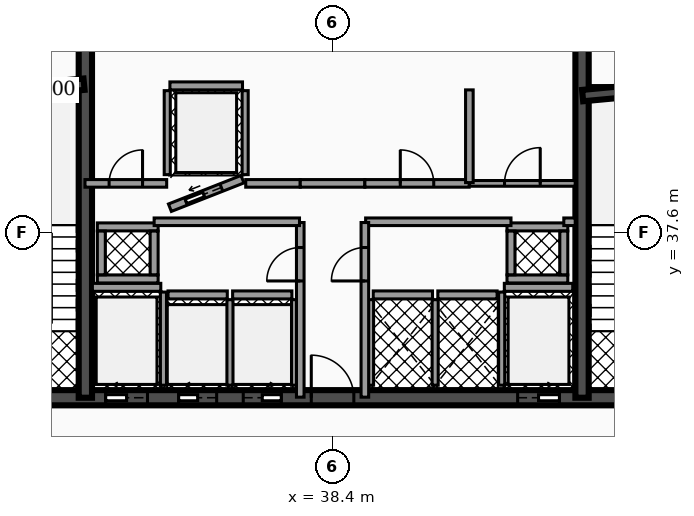
"""IFC4 building model, lengths in metres.
Left out: names, types, materials, properties, quantities, classifications, styles, units other than length and angle.
Written with IfcOpenShell. Run it as: python <this file> out.ifc"""

import sys

from ifc_helpers import new_model, si_unit, direction, frame, frame_2d, origin, place, context, subcontext, project, spatial, rectangle, extrude, element, fill, save


model = new_model("IFC4")
c1 = context("Model", 3, precision=1e-05, world=origin(), true_north=direction((0.0, 1.0)))
c2 = subcontext(c1, "Body", "Model", "MODEL_VIEW")
j1 = project(units=[si_unit("LENGTHUNIT", "METRE"), si_unit("PLANEANGLEUNIT", "RADIAN")], contexts=[c1])
p1 = place(None, origin())
s1 = spatial("IfcSite", under=j1, at=p1, CompositionType="ELEMENT")
p2 = place(p1, origin())
s2 = spatial("IfcBuilding", under=s1, at=p2, CompositionType="ELEMENT")
p3 = place(p2, frame((0.0, 0.0, 190.74)))
s3 = spatial("IfcBuildingStorey", under=s2, at=p3, CompositionType="ELEMENT", Elevation=190.74)
p4 = place(p3, frame((28.4, 33.25, 0.0), z_axis=(0.0, 0.0, 1.0), x_axis=(1.0, 0.0, 0.0)))
e1 = element("IfcWall", 1, at=p4, inside=s3, PredefinedType="SHEAR", context=c2, shape_type="SweptSolid", body=[
    extrude(rectangle(XDim=20.06, YDim=0.4, at=frame_2d((10.03, 0.0))), origin(), (0.0, 0.0, 1.0), 3.39),
])
p5 = place(p4, frame((4.03, 0.0, 0.0)))
e2 = element("IfcOpeningElement", 2, at=p5, cuts=e1, PredefinedType="OPENING", context=c2, shape_type="SweptSolid", body=[
    extrude(rectangle(XDim=1.1, YDim=2.15, at=frame_2d((0.55, 1.075))), frame((0.0, 0.21, 0.0), z_axis=(0.0, -1.0, 0.0), x_axis=(1.0, 0.0, 0.0)), (0.0, 0.0, 1.0), 0.42),
])
p6 = place(p4, frame((14.87, 0.0, 0.0)))
e3 = element("IfcOpeningElement", 3, at=p6, cuts=e1, PredefinedType="OPENING", context=c2, shape_type="SweptSolid", body=[
    extrude(rectangle(XDim=1.1, YDim=2.15, at=frame_2d((0.55, 1.075))), frame((0.0, 0.21, 0.0), z_axis=(0.0, -1.0, 0.0), x_axis=(1.0, 0.0, 0.0)), (0.0, 0.0, 1.0), 0.42),
])
p7 = place(p4, frame((5.95, 0.0, 0.0)))
e4 = element("IfcOpeningElement", 4, at=p7, cuts=e1, PredefinedType="OPENING", context=c2, shape_type="SweptSolid", body=[
    extrude(rectangle(XDim=1.0, YDim=2.1, at=frame_2d((0.5, 1.05))), frame((0.0, 0.21, 0.0), z_axis=(0.0, -1.0, 0.0), x_axis=(1.0, 0.0, 0.0)), (0.0, 0.0, 1.0), 0.42),
])
p8 = place(p4, frame((7.65, 0.0, 0.0)))
e5 = element("IfcOpeningElement", 5, at=p8, cuts=e1, PredefinedType="OPENING", context=c2, shape_type="SweptSolid", body=[
    extrude(rectangle(XDim=1.0, YDim=2.1, at=frame_2d((0.5, 1.05))), frame((0.0, 0.21, 0.0), z_axis=(0.0, -1.0, 0.0), x_axis=(1.0, 0.0, 0.0)), (0.0, 0.0, 1.0), 0.42),
])
p9 = place(p4, frame((1.31, 0.0, 0.0)))
e6 = element("IfcOpeningElement", 6, at=p9, cuts=e1, PredefinedType="OPENING", context=c2, shape_type="SweptSolid", body=[
    extrude(rectangle(XDim=1.1, YDim=2.2, at=frame_2d((0.55, 1.1))), frame((0.0, 0.21, 0.0), z_axis=(0.0, -1.0, 0.0), x_axis=(1.0, 0.0, 0.0)), (0.0, 0.0, 1.0), 0.42),
])
p10 = place(p4, frame((9.44, 0.0, 0.0)))
e7 = element("IfcOpeningElement", 7, at=p10, cuts=e1, PredefinedType="OPENING", context=c2, shape_type="SweptSolid", body=[
    extrude(rectangle(XDim=1.12, YDim=2.05, at=frame_2d((0.56, 1.025))), frame((0.0, 0.21, 0.0), z_axis=(0.0, -1.0, 0.0), x_axis=(1.0, 0.0, 0.0)), (0.0, 0.0, 1.0), 0.42),
])
p11 = place(p4, frame((17.65, 0.0, 0.0)))
e8 = element("IfcOpeningElement", 8, at=p11, cuts=e1, PredefinedType="OPENING", context=c2, shape_type="SweptSolid", body=[
    extrude(rectangle(XDim=1.1, YDim=2.2, at=frame_2d((0.55, 1.1))), frame((0.0, 0.21, 0.0), z_axis=(0.0, -1.0, 0.0), x_axis=(1.0, 0.0, 0.0)), (0.0, 0.0, 1.0), 0.42),
])
for number, where, z_axis, x_axis in (
    (9, (31.895, 33.25, 0.0), (0.0, 0.0, 1.0), (0.0, 1.0, 0.0)),
    (10, (44.965, 33.25, 0.0), (0.0, 0.0, 1.0), (0.0, 1.0, 0.0)),
):
    element("IfcWall", number, at=place(p3, frame(where, z_axis=z_axis, x_axis=x_axis)), inside=s3, PredefinedType="SHEAR", context=c2, shape_type="SweptSolid", body=[
        extrude(rectangle(XDim=10.2, YDim=0.35, at=frame_2d((5.1, 0.0))), origin(), (0.0, 0.0, 1.0), 3.39),
    ])
p12 = place(p3, frame((28.64, 41.2, 0.0), z_axis=(0.0, 0.0, 1.0), x_axis=(0.995687118776, 0.092774789157, 0.0)))
e11 = element("IfcWall", 11, at=p12, inside=s3, PredefinedType="SHEAR", context=c2, shape_type="SweptSolid", body=[
    extrude(rectangle(XDim=3.234, YDim=0.3, at=frame_2d((1.617, 0.0))), origin(), (0.0, 0.0, 1.0), 3.39),
])
p13 = place(p3, frame((44.98, 41.2, 0.0), z_axis=(0.0, 0.0, 1.0), x_axis=(0.995686468965, 0.09278176286, 0.0)))
e12 = element("IfcWall", 12, at=p13, inside=s3, PredefinedType="SHEAR", context=c2, shape_type="SweptSolid", body=[
    extrude(rectangle(XDim=3.234, YDim=0.3, at=frame_2d((1.617, 0.0))), origin(), (0.0, 0.0, 1.0), 3.39),
])
p14 = place(p3, frame((32.08, 36.155, 0.0), z_axis=(0.0, 0.0, 1.0), x_axis=(1.0, 0.0, 0.0)))
e13 = element("IfcWall", 13, at=p14, inside=s3, PredefinedType="SOLIDWALL", context=c2, shape_type="SweptSolid", body=[
    extrude(rectangle(XDim=1.8, YDim=0.21, at=frame_2d((0.9, 0.0))), origin(), (0.0, 0.0, 1.0), 3.39),
])
p15 = place(p3, frame((33.95, 33.58, 0.0), z_axis=(0.0, 0.0, 1.0), x_axis=(0.0, 1.0, 0.0)))
e14 = element("IfcWall", 14, at=p15, inside=s3, PredefinedType="SOLIDWALL", context=c2, shape_type="SweptSolid", body=[
    extrude(rectangle(XDim=2.45, YDim=0.16, at=frame_2d((1.225, 0.0))), origin(), (0.0, 0.0, 1.0), 3.39),
])
p16 = place(p3, frame((42.92, 36.155, 0.0), z_axis=(0.0, 0.0, 1.0), x_axis=(1.0, 0.0, 0.0)))
e15 = element("IfcWall", 15, at=p16, inside=s3, PredefinedType="SOLIDWALL", context=c2, shape_type="SweptSolid", body=[
    extrude(rectangle(XDim=1.8, YDim=0.21, at=frame_2d((0.9, 0.0))), origin(), (0.0, 0.0, 1.0), 3.39),
])
p17 = place(p3, frame((42.85, 33.58, 0.0), z_axis=(0.0, 0.0, 1.0), x_axis=(0.0, 1.0, 0.0)))
e16 = element("IfcWall", 16, at=p17, inside=s3, PredefinedType="SOLIDWALL", context=c2, shape_type="SweptSolid", body=[
    extrude(rectangle(XDim=2.45, YDim=0.16, at=frame_2d((1.225, 0.0))), origin(), (0.0, 0.0, 1.0), 3.39),
])
p18 = place(p3, frame((34.07, 35.955, 0.0), z_axis=(0.0, 0.0, 1.0), x_axis=(1.0, 0.0, 0.0)))
e17 = element("IfcWall", 17, at=p18, inside=s3, PredefinedType="SOLIDWALL", context=c2, shape_type="SweptSolid", body=[
    extrude(rectangle(XDim=1.56, YDim=0.21, at=frame_2d((0.78, 0.0))), origin(), (0.0, 0.0, 1.0), 3.39),
])
p19 = place(p3, frame((35.7, 33.58, 0.0), z_axis=(0.0, 0.0, 1.0), x_axis=(0.0, 1.0, 0.0)))
e18 = element("IfcWall", 18, at=p19, inside=s3, PredefinedType="SOLIDWALL", context=c2, shape_type="SweptSolid", body=[
    extrude(rectangle(XDim=2.25, YDim=0.16, at=frame_2d((1.125, 0.0))), origin(), (0.0, 0.0, 1.0), 3.39),
])
p20 = place(p3, frame((35.77, 35.955, 0.0), z_axis=(0.0, 0.0, 1.0), x_axis=(1.0, 0.0, 0.0)))
e19 = element("IfcWall", 19, at=p20, inside=s3, PredefinedType="SOLIDWALL", context=c2, shape_type="SweptSolid", body=[
    extrude(rectangle(XDim=1.56, YDim=0.21, at=frame_2d((0.78, 0.0))), origin(), (0.0, 0.0, 1.0), 3.39),
])
p21 = place(p3, frame((37.4, 33.58, 0.0), z_axis=(0.0, 0.0, 1.0), x_axis=(0.0, 1.0, 0.0)))
e20 = element("IfcWall", 20, at=p21, inside=s3, PredefinedType="SOLIDWALL", context=c2, shape_type="SweptSolid", body=[
    extrude(rectangle(XDim=2.25, YDim=0.16, at=frame_2d((1.125, 0.0))), origin(), (0.0, 0.0, 1.0), 3.39),
])
p22 = place(p3, frame((34.12, 38.25, 0.0), z_axis=(0.0, 0.0, 1.0), x_axis=(0.930804993012, 0.36551616241, 0.0)))
e21 = element("IfcWall", 21, at=p22, inside=s3, PredefinedType="SOLIDWALL", context=c2, shape_type="SweptSolid", body=[
    extrude(rectangle(XDim=2.052, YDim=0.21, at=frame_2d((1.026, 0.0))), origin(), (0.0, 0.0, 1.0), 3.39),
])
p23 = place(p22, frame((0.455, 0.0, 0.0)))
e22 = element("IfcOpeningElement", 22, at=p23, cuts=e21, PredefinedType="OPENING", context=c2, shape_type="SweptSolid", body=[
    extrude(rectangle(XDim=1.0, YDim=2.1, at=frame_2d((0.5, 1.05))), frame((0.0, 0.115, 0.0), z_axis=(0.0, -1.0, 0.0), x_axis=(1.0, 0.0, 0.0)), (0.0, 0.0, 1.0), 0.23),
])
p24 = place(p3, frame((34.12, 41.455, 0.0), z_axis=(0.0, 0.0, 1.0), x_axis=(1.0, 0.0, 0.0)))
e23 = element("IfcWall", 23, at=p24, inside=s3, PredefinedType="SOLIDWALL", context=c2, shape_type="SweptSolid", body=[
    extrude(rectangle(XDim=1.91, YDim=0.21, at=frame_2d((0.955, 0.0))), origin(), (0.0, 0.0, 1.0), 3.39),
])
for number, where, z_axis, x_axis in (
    (24, (34.05, 39.12, 0.0), (0.0, 0.0, 1.0), (0.0, 1.0, 0.0)),
    (25, (36.1, 39.12, 0.0), (0.0, 0.0, 1.0), (0.0, 1.0, 0.0)),
):
    element("IfcWall", number, at=place(p3, frame(where, z_axis=z_axis, x_axis=x_axis)), inside=s3, PredefinedType="SOLIDWALL", context=c2, shape_type="SweptSolid", body=[
        extrude(rectangle(XDim=2.21, YDim=0.16, at=frame_2d((1.105, 0.0))), origin(), (0.0, 0.0, 1.0), 3.39),
    ])
p25 = place(p3, frame((39.47, 35.955, 0.0), z_axis=(0.0, 0.0, 1.0), x_axis=(1.0, 0.0, 0.0)))
e26 = element("IfcWall", 26, at=p25, inside=s3, PredefinedType="SOLIDWALL", context=c2, shape_type="SweptSolid", body=[
    extrude(rectangle(XDim=1.56, YDim=0.21, at=frame_2d((0.78, 0.0))), origin(), (0.0, 0.0, 1.0), 3.39),
])
for number, where, z_axis, x_axis in (
    (27, (39.4, 33.58, 0.0), (0.0, 0.0, 1.0), (0.0, 1.0, 0.0)),
    (28, (41.1, 33.58, 0.0), (0.0, 0.0, 1.0), (0.0, 1.0, 0.0)),
):
    element("IfcWall", number, at=place(p3, frame(where, z_axis=z_axis, x_axis=x_axis)), inside=s3, PredefinedType="SOLIDWALL", context=c2, shape_type="SweptSolid", body=[
        extrude(rectangle(XDim=2.25, YDim=0.16, at=frame_2d((1.125, 0.0))), origin(), (0.0, 0.0, 1.0), 3.39),
    ])
p26 = place(p3, frame((41.17, 35.955, 0.0), z_axis=(0.0, 0.0, 1.0), x_axis=(1.0, 0.0, 0.0)))
e29 = element("IfcWall", 29, at=p26, inside=s3, PredefinedType="SOLIDWALL", context=c2, shape_type="SweptSolid", body=[
    extrude(rectangle(XDim=1.56, YDim=0.21, at=frame_2d((0.78, 0.0))), origin(), (0.0, 0.0, 1.0), 3.39),
])
for number, where, z_axis, x_axis in (
    (30, (32.21, 36.375, 0.0), (0.0, 0.0, 1.0), (1.0, 0.0, 0.0)),
    (31, (32.21, 37.745, 0.0), (0.0, 0.0, 1.0), (1.0, 0.0, 0.0)),
):
    element("IfcWall", number, at=place(p3, frame(where, z_axis=z_axis, x_axis=x_axis)), inside=s3, PredefinedType="SOLIDWALL", context=c2, shape_type="SweptSolid", body=[
        extrude(rectangle(XDim=1.6, YDim=0.21, at=frame_2d((0.8, 0.0))), origin(), (0.0, 0.0, 1.0), 3.39),
    ])
for number, where, z_axis, x_axis in (
    (32, (32.315, 36.485, 0.0), (0.0, 0.0, 1.0), (0.0, 1.0, 0.0)),
    (33, (33.705, 36.485, 0.0), (0.0, 0.0, 1.0), (0.0, 1.0, 0.0)),
):
    element("IfcWall", number, at=place(p3, frame(where, z_axis=z_axis, x_axis=x_axis)), inside=s3, PredefinedType="SOLIDWALL", context=c2, shape_type="SweptSolid", body=[
        extrude(rectangle(XDim=1.15, YDim=0.21, at=frame_2d((0.575, 0.0))), origin(), (0.0, 0.0, 1.0), 3.39),
    ])
for number, where, z_axis, x_axis in (
    (34, (42.99, 36.375, 0.0), (0.0, 0.0, 1.0), (1.0, 0.0, 0.0)),
    (35, (42.99, 37.745, 0.0), (0.0, 0.0, 1.0), (1.0, 0.0, 0.0)),
):
    element("IfcWall", number, at=place(p3, frame(where, z_axis=z_axis, x_axis=x_axis)), inside=s3, PredefinedType="SOLIDWALL", context=c2, shape_type="SweptSolid", body=[
        extrude(rectangle(XDim=1.6, YDim=0.21, at=frame_2d((0.8, 0.0))), origin(), (0.0, 0.0, 1.0), 3.39),
    ])
for number, where, z_axis, x_axis in (
    (36, (43.095, 36.485, 0.0), (0.0, 0.0, 1.0), (0.0, 1.0, 0.0)),
    (37, (44.485, 36.485, 0.0), (0.0, 0.0, 1.0), (0.0, 1.0, 0.0)),
):
    element("IfcWall", number, at=place(p3, frame(where, z_axis=z_axis, x_axis=x_axis)), inside=s3, PredefinedType="SOLIDWALL", context=c2, shape_type="SweptSolid", body=[
        extrude(rectangle(XDim=1.15, YDim=0.21, at=frame_2d((0.575, 0.0))), origin(), (0.0, 0.0, 1.0), 3.39),
    ])
p27 = place(p3, frame((37.55, 33.265, 0.0), z_axis=(0.0, 0.0, 1.0), x_axis=(0.0, 1.0, 0.0)))
e38 = element("IfcWall", 38, at=p27, inside=s3, PredefinedType="PARTITIONING", context=c2, shape_type="SweptSolid", body=[
    extrude(rectangle(XDim=4.595, YDim=0.2, at=frame_2d((2.298, 0.0))), origin(), (0.0, 0.0, 1.0), 2.347),
])
p28 = place(p27, frame((3.058, 0.0, 0.0)))
e39 = element("IfcOpeningElement", 39, at=p28, cuts=e38, PredefinedType="OPENING", context=c2, shape_type="SweptSolid", body=[
    extrude(rectangle(XDim=0.88, YDim=2.05, at=frame_2d((0.44, 1.025))), frame((0.0, 0.11, 0.0), z_axis=(0.0, -1.0, 0.0), x_axis=(1.0, 0.0, 0.0)), (0.0, 0.0, 1.0), 0.22),
])
p29 = place(p3, frame((33.705, 37.88, 0.0), z_axis=(0.0, 0.0, 1.0), x_axis=(1.0, 0.0, 0.0)))
e40 = element("IfcWall", 40, at=p29, inside=s3, PredefinedType="PARTITIONING", context=c2, shape_type="SweptSolid", body=[
    extrude(rectangle(XDim=3.825, YDim=0.2, at=frame_2d((1.913, 0.0))), origin(), (0.0, 0.0, 1.0), 2.347),
])
p30 = place(p3, frame((31.885, 38.89, 0.0), z_axis=(0.0, 0.0, 1.0), x_axis=(1.0, 0.0, 0.0)))
e41 = element("IfcWall", 41, at=p30, inside=s3, PredefinedType="PARTITIONING", context=c2, shape_type="SweptSolid", body=[
    extrude(rectangle(XDim=2.15, YDim=0.2, at=frame_2d((1.075, 0.0))), origin(), (0.0, 0.0, 1.0), 2.347),
])
p31 = place(p30, frame((0.635, 0.0, 0.0)))
e42 = element("IfcOpeningElement", 42, at=p31, cuts=e41, PredefinedType="OPENING", context=c2, shape_type="SweptSolid", body=[
    extrude(rectangle(XDim=0.88, YDim=2.05, at=frame_2d((0.44, 1.025))), frame((0.0, 0.11, 0.0), z_axis=(0.0, -1.0, 0.0), x_axis=(1.0, 0.0, 0.0)), (0.0, 0.0, 1.0), 0.22),
])
p32 = place(p3, frame((36.115, 38.89, 0.0), z_axis=(0.0, 0.0, 1.0), x_axis=(1.0, 0.0, 0.0)))
e43 = element("IfcWall", 43, at=p32, inside=s3, PredefinedType="PARTITIONING", context=c2, shape_type="SweptSolid", body=[
    extrude(rectangle(XDim=1.435, YDim=0.2, at=frame_2d((0.718, 0.0))), origin(), (0.0, 0.0, 1.0), 2.347),
])
p33 = place(p3, frame((37.55, 38.89, 0.0), z_axis=(0.0, 0.0, 1.0), x_axis=(1.0, 0.0, 0.0)))
e44 = element("IfcWall", 44, at=p33, inside=s3, PredefinedType="PARTITIONING", context=c2, shape_type="SweptSolid", body=[
    extrude(rectangle(XDim=1.7, YDim=0.2, at=frame_2d((0.85, 0.0))), origin(), (0.0, 0.0, 1.0), 2.347),
])
p34 = place(p3, frame((39.25, 38.89, 0.0), z_axis=(0.0, 0.0, 1.0), x_axis=(1.0, 0.0, 0.0)))
e45 = element("IfcWall", 45, at=p34, inside=s3, PredefinedType="PARTITIONING", context=c2, shape_type="SweptSolid", body=[
    extrude(rectangle(XDim=2.745, YDim=0.2, at=frame_2d((1.373, 0.0))), origin(), (0.0, 0.0, 1.0), 2.347),
])
p35 = place(p34, frame((0.933, 0.0, 0.0)))
e46 = element("IfcOpeningElement", 46, at=p35, cuts=e45, PredefinedType="OPENING", context=c2, shape_type="SweptSolid", body=[
    extrude(rectangle(XDim=0.88, YDim=2.05, at=frame_2d((0.44, 1.025))), frame((0.0, 0.11, 0.0), z_axis=(0.0, -1.0, 0.0), x_axis=(1.0, 0.0, 0.0)), (0.0, 0.0, 1.0), 0.22),
])
p36 = place(p3, frame((42.005, 38.89, 0.0), z_axis=(0.0, 0.0, 1.0), x_axis=(1.0, 0.0, 0.0)))
e47 = element("IfcWall", 47, at=p36, inside=s3, PredefinedType="PARTITIONING", context=c2, shape_type="SweptSolid", body=[
    extrude(rectangle(XDim=2.78, YDim=0.15, at=frame_2d((1.39, 0.0))), origin(), (0.0, 0.0, 1.0), 2.347),
])
p37 = place(p36, frame((0.92, 0.0, 0.0)))
e48 = element("IfcOpeningElement", 48, at=p37, cuts=e47, PredefinedType="OPENING", context=c2, shape_type="SweptSolid", body=[
    extrude(rectangle(XDim=0.94, YDim=2.05, at=frame_2d((0.47, 1.025))), frame((0.0, 0.085, 0.0), z_axis=(0.0, -1.0, 0.0), x_axis=(1.0, 0.0, 0.0)), (0.0, 0.0, 1.0), 0.17),
])
p38 = place(p3, frame((39.27, 37.88, 0.0), z_axis=(0.0, 0.0, 1.0), x_axis=(1.0, 0.0, 0.0)))
e49 = element("IfcWall", 49, at=p38, inside=s3, PredefinedType="PARTITIONING", context=c2, shape_type="SweptSolid", body=[
    extrude(rectangle(XDim=3.825, YDim=0.2, at=frame_2d((1.913, 0.0))), origin(), (0.0, 0.0, 1.0), 2.347),
])
p39 = place(p3, frame((44.485, 37.88, 0.0), z_axis=(0.0, 0.0, 1.0), x_axis=(1.0, 0.0, 0.0)))
e50 = element("IfcWall", 50, at=p39, inside=s3, PredefinedType="PARTITIONING", context=c2, shape_type="SweptSolid", body=[
    extrude(rectangle(XDim=0.3, YDim=0.2, at=frame_2d((0.15, 0.0))), origin(), (0.0, 0.0, 1.0), 2.347),
])
p40 = place(p3, frame((39.25, 33.265, 0.0), z_axis=(0.0, 0.0, 1.0), x_axis=(0.0, 1.0, 0.0)))
e51 = element("IfcWall", 51, at=p40, inside=s3, PredefinedType="PARTITIONING", context=c2, shape_type="SweptSolid", body=[
    extrude(rectangle(XDim=4.595, YDim=0.2, at=frame_2d((2.298, 0.0))), origin(), (0.0, 0.0, 1.0), 2.347),
])
p41 = place(p40, frame((3.058, 0.0, 0.0)))
e52 = element("IfcOpeningElement", 52, at=p41, cuts=e51, PredefinedType="OPENING", context=c2, shape_type="SweptSolid", body=[
    extrude(rectangle(XDim=0.88, YDim=2.05, at=frame_2d((0.44, 1.025))), frame((0.0, 0.11, 0.0), z_axis=(0.0, -1.0, 0.0), x_axis=(1.0, 0.0, 0.0)), (0.0, 0.0, 1.0), 0.22),
])
p42 = place(p3, frame((42.0, 38.91, 0.0), z_axis=(0.0, 0.0, 1.0), x_axis=(0.0, 1.0, 0.0)))
e53 = element("IfcWall", 53, at=p42, inside=s3, PredefinedType="PARTITIONING", context=c2, shape_type="SweptSolid", body=[
    extrude(rectangle(XDim=2.44, YDim=0.2, at=frame_2d((1.22, 0.0))), origin(), (0.0, 0.0, 1.0), 2.347),
])
p43 = place(p5, origin())
e54 = element("IfcDoor", 54, at=p43, inside=s3, OperationType="SLIDING_TO_LEFT", PredefinedType="DOOR", context=c2, shape_type="SweptSolid", body=[
    extrude(rectangle(XDim=1.1, YDim=2.15, at=frame_2d((0.55, 1.075))), frame((0.0, 0.025, 0.0), z_axis=(0.0, -1.0, 0.0), x_axis=(1.0, 0.0, 0.0)), (0.0, 0.0, 1.0), 0.05),
])
fill(e2, e54)
p44 = place(p6, origin())
e55 = element("IfcDoor", 55, at=p44, inside=s3, OperationType="SLIDING_TO_RIGHT", PredefinedType="DOOR", context=c2, shape_type="SweptSolid", body=[
    extrude(rectangle(XDim=1.1, YDim=2.15, at=frame_2d((0.55, 1.075))), frame((0.0, 0.025, 0.0), z_axis=(0.0, -1.0, 0.0), x_axis=(1.0, 0.0, 0.0)), (0.0, 0.0, 1.0), 0.05),
])
fill(e3, e55)
p45 = place(p7, origin())
e56 = element("IfcDoor", 56, at=p45, inside=s3, OperationType="SLIDING_TO_LEFT", PredefinedType="DOOR", context=c2, shape_type="SweptSolid", body=[
    extrude(rectangle(XDim=1.0, YDim=2.1, at=frame_2d((0.5, 1.05))), frame((0.0, 0.025, 0.0), z_axis=(0.0, -1.0, 0.0), x_axis=(1.0, 0.0, 0.0)), (0.0, 0.0, 1.0), 0.05),
])
fill(e4, e56)
p46 = place(p8, origin())
e57 = element("IfcDoor", 57, at=p46, inside=s3, OperationType="SLIDING_TO_RIGHT", PredefinedType="DOOR", context=c2, shape_type="SweptSolid", body=[
    extrude(rectangle(XDim=1.0, YDim=2.1, at=frame_2d((0.5, 1.05))), frame((0.0, 0.025, 0.0), z_axis=(0.0, -1.0, 0.0), x_axis=(1.0, 0.0, 0.0)), (0.0, 0.0, 1.0), 0.05),
])
fill(e5, e57)
p47 = place(p23, origin())
e58 = element("IfcDoor", 58, at=p47, inside=s3, OperationType="SLIDING_TO_LEFT", PredefinedType="DOOR", context=c2, shape_type="SweptSolid", body=[
    extrude(rectangle(XDim=1.0, YDim=2.1, at=frame_2d((0.5, 1.05))), frame((0.0, 0.025, 0.0), z_axis=(0.0, -1.0, 0.0), x_axis=(1.0, 0.0, 0.0)), (0.0, 0.0, 1.0), 0.05),
])
fill(e22, e58)
p48 = place(p10, origin())
e59 = element("IfcDoor", 59, at=p48, inside=s3, OperationType="SINGLE_SWING_LEFT", PredefinedType="DOOR", context=c2, shape_type="SweptSolid", body=[
    extrude(rectangle(XDim=1.12, YDim=2.05, at=frame_2d((0.56, 1.025))), frame((0.0, 0.025, 0.0), z_axis=(0.0, -1.0, 0.0), x_axis=(1.0, 0.0, 0.0)), (0.0, 0.0, 1.0), 0.05),
])
fill(e7, e59)
p49 = place(p28, origin())
e60 = element("IfcDoor", 60, at=p49, inside=s3, OperationType="SINGLE_SWING_LEFT", PredefinedType="DOOR", context=c2, shape_type="SweptSolid", body=[
    extrude(rectangle(XDim=0.88, YDim=2.05, at=frame_2d((0.44, 1.025))), frame((0.0, 0.025, 0.0), z_axis=(0.0, -1.0, 0.0), x_axis=(1.0, 0.0, 0.0)), (0.0, 0.0, 1.0), 0.05),
])
fill(e39, e60)
p50 = place(p31, origin())
e61 = element("IfcDoor", 61, at=p50, inside=s3, OperationType="SINGLE_SWING_RIGHT", PredefinedType="DOOR", context=c2, shape_type="SweptSolid", body=[
    extrude(rectangle(XDim=0.88, YDim=2.05, at=frame_2d((0.44, 1.025))), frame((0.0, 0.025, 0.0), z_axis=(0.0, -1.0, 0.0), x_axis=(1.0, 0.0, 0.0)), (0.0, 0.0, 1.0), 0.05),
])
fill(e42, e61)
p51 = place(p35, origin())
e62 = element("IfcDoor", 62, at=p51, inside=s3, OperationType="SINGLE_SWING_LEFT", PredefinedType="DOOR", context=c2, shape_type="SweptSolid", body=[
    extrude(rectangle(XDim=0.88, YDim=2.05, at=frame_2d((0.44, 1.025))), frame((0.0, 0.025, 0.0), z_axis=(0.0, -1.0, 0.0), x_axis=(1.0, 0.0, 0.0)), (0.0, 0.0, 1.0), 0.05),
])
fill(e46, e62)
p52 = place(p37, origin())
e63 = element("IfcDoor", 63, at=p52, inside=s3, OperationType="SINGLE_SWING_RIGHT", PredefinedType="DOOR", context=c2, shape_type="SweptSolid", body=[
    extrude(rectangle(XDim=0.94, YDim=2.05, at=frame_2d((0.47, 1.025))), frame((0.0, 0.025, 0.0), z_axis=(0.0, -1.0, 0.0), x_axis=(1.0, 0.0, 0.0)), (0.0, 0.0, 1.0), 0.05),
])
fill(e48, e63)
p53 = place(p41, origin())
e64 = element("IfcDoor", 64, at=p53, inside=s3, OperationType="SINGLE_SWING_LEFT", PredefinedType="DOOR", context=c2, shape_type="SweptSolid", body=[
    extrude(rectangle(XDim=0.88, YDim=2.05, at=frame_2d((0.44, 1.025))), frame((0.0, 0.025, 0.0), z_axis=(0.0, -1.0, 0.0), x_axis=(1.0, 0.0, 0.0)), (0.0, 0.0, 1.0), 0.05),
])
fill(e52, e64)
save(model, sys.argv[1])
